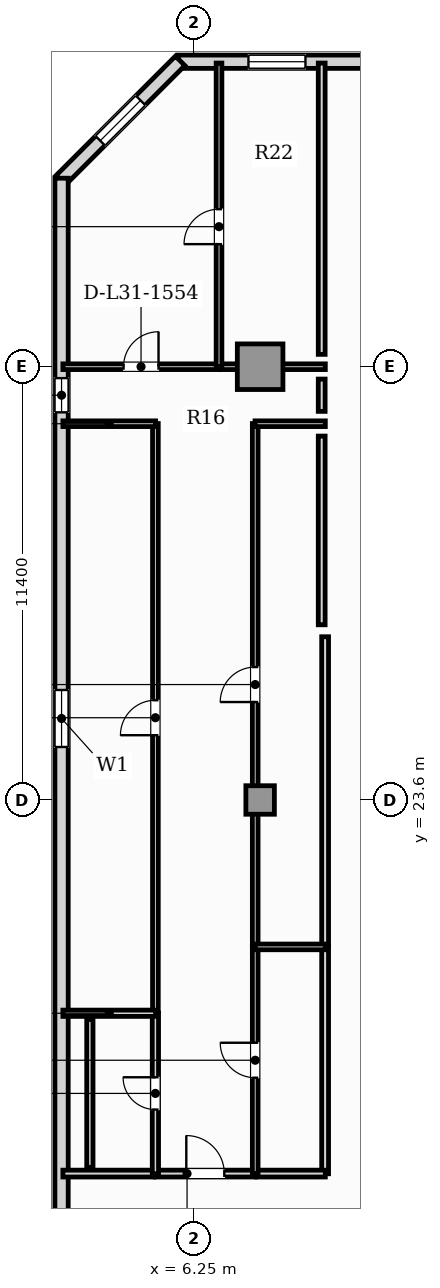
"""IFC4 building model, lengths in metres.
Left out: names, types, materials, properties, quantities, classifications, styles, units other than length and angle.
Written with IfcOpenShell. Run it as: python <this file> out.ifc"""

import sys

from ifc_helpers import new_model, si_unit, direction, frame, frame_2d, origin, origin_2d, place, context, subcontext, project, spatial, rectangle, hollow_rectangle, extrude, element, fill, save


model = new_model("IFC4")
c1 = context("Model", 3, precision=1e-05, world=origin(), true_north=direction((0.0, 1.0)))
c2 = subcontext(c1, "Body", "Model", "MODEL_VIEW")
j1 = project(units=[si_unit("LENGTHUNIT", "METRE"), si_unit("PLANEANGLEUNIT", "RADIAN")], contexts=[c1])
p1 = place(None, origin())
s1 = spatial("IfcSite", under=j1, at=p1, CompositionType="ELEMENT")
p2 = place(p1, origin())
s2 = spatial("IfcBuilding", under=s1, at=p2, CompositionType="ELEMENT")
p3 = place(p2, frame((0.0, 0.0, 127.25)))
s3 = spatial("IfcBuildingStorey", under=s2, at=p3, CompositionType="ELEMENT", Elevation=127.25)
p4 = place(p3, frame((8.0, 35.0, 0.0), z_axis=(0.0, 0.0, 1.0), x_axis=(1.0, 0.0, 0.0)))
e1 = element("IfcColumn", 1, at=p4, inside=s3, PredefinedType="USERDEFINED", context=c2, shape_type="SweptSolid", body=[
    extrude(hollow_rectangle(XDim=1.2, YDim=1.2, WallThickness=0.07, at=origin_2d()), origin(), (0.0, 0.0, 1.0), 3.85),
])
p5 = place(p3, frame((8.0, 23.6, 0.0), z_axis=(0.0, 0.0, 1.0), x_axis=(1.0, 0.0, 0.0)))
e2 = element("IfcColumn", 2, at=p5, inside=s3, PredefinedType="COLUMN", context=c2, shape_type="SweptSolid", body=[
    extrude(rectangle(XDim=0.75, YDim=0.75, at=origin_2d()), origin(), (0.0, 0.0, 1.0), 3.85),
])
p6 = place(p3, frame((51.66, 43.025, 0.0), z_axis=(0.0, 0.0, 1.0), x_axis=(-1.0, 0.0, 0.0)))
e3 = element("IfcWall", 3, at=p6, inside=s3, PredefinedType="SOLIDWALL", context=c2, shape_type="SweptSolid", body=[
    extrude(rectangle(XDim=45.82, YDim=0.35, at=frame_2d((22.91, 0.0))), origin(), (0.0, 0.0, 1.0), 3.6),
])
p7 = place(p6, frame((42.468, 0.0, 0.9)))
e4 = element("IfcOpeningElement", 4, at=p7, cuts=e3, PredefinedType="OPENING", context=c2, shape_type="SweptSolid", body=[
    extrude(rectangle(XDim=1.5, YDim=1.95, at=frame_2d((0.75, 0.975))), frame((0.0, 0.185, 0.0), z_axis=(0.0, -1.0, 0.0), x_axis=(1.0, 0.0, 0.0)), (0.0, 0.0, 1.0), 0.37),
])
p8 = place(p6, frame((1.853, 0.0, 0.9)))
e5 = element("IfcOpeningElement", 5, at=p8, cuts=e3, PredefinedType="OPENING", context=c2, shape_type="SweptSolid", body=[
    extrude(rectangle(XDim=1.5, YDim=1.95, at=frame_2d((0.75, 0.975))), frame((0.0, 0.185, 0.0), z_axis=(0.0, -1.0, 0.0), x_axis=(1.0, 0.0, 0.0)), (0.0, 0.0, 1.0), 0.37),
])
p9 = place(p6, frame((36.457, 0.0, 0.9)))
e6 = element("IfcOpeningElement", 6, at=p9, cuts=e3, PredefinedType="OPENING", context=c2, shape_type="SweptSolid", body=[
    extrude(rectangle(XDim=1.5, YDim=1.95, at=frame_2d((0.75, 0.975))), frame((0.0, 0.185, 0.0), z_axis=(0.0, -1.0, 0.0), x_axis=(1.0, 0.0, 0.0)), (0.0, 0.0, 1.0), 0.37),
])
p10 = place(p6, frame((31.777, 0.0, 0.9)))
e7 = element("IfcOpeningElement", 7, at=p10, cuts=e3, PredefinedType="OPENING", context=c2, shape_type="SweptSolid", body=[
    extrude(rectangle(XDim=1.5, YDim=1.95, at=frame_2d((0.75, 0.975))), frame((0.0, 0.185, 0.0), z_axis=(0.0, -1.0, 0.0), x_axis=(1.0, 0.0, 0.0)), (0.0, 0.0, 1.0), 0.37),
])
p11 = place(p6, frame((27.748, 0.0, 0.9)))
e8 = element("IfcOpeningElement", 8, at=p11, cuts=e3, PredefinedType="OPENING", context=c2, shape_type="SweptSolid", body=[
    extrude(rectangle(XDim=1.5, YDim=1.95, at=frame_2d((0.75, 0.975))), frame((0.0, 0.185, 0.0), z_axis=(0.0, -1.0, 0.0), x_axis=(1.0, 0.0, 0.0)), (0.0, 0.0, 1.0), 0.37),
])
p12 = place(p6, frame((23.998, 0.0, 0.9)))
e9 = element("IfcOpeningElement", 9, at=p12, cuts=e3, PredefinedType="OPENING", context=c2, shape_type="SweptSolid", body=[
    extrude(rectangle(XDim=1.5, YDim=1.95, at=frame_2d((0.75, 0.975))), frame((0.0, 0.185, 0.0), z_axis=(0.0, -1.0, 0.0), x_axis=(1.0, 0.0, 0.0)), (0.0, 0.0, 1.0), 0.37),
])
p13 = place(p6, frame((20.118, 0.0, 0.9)))
e10 = element("IfcOpeningElement", 10, at=p13, cuts=e3, PredefinedType="OPENING", context=c2, shape_type="SweptSolid", body=[
    extrude(rectangle(XDim=1.5, YDim=1.95, at=frame_2d((0.75, 0.975))), frame((0.0, 0.185, 0.0), z_axis=(0.0, -1.0, 0.0), x_axis=(1.0, 0.0, 0.0)), (0.0, 0.0, 1.0), 0.37),
])
p14 = place(p6, frame((16.368, 0.0, 0.9)))
e11 = element("IfcOpeningElement", 11, at=p14, cuts=e3, PredefinedType="OPENING", context=c2, shape_type="SweptSolid", body=[
    extrude(rectangle(XDim=1.5, YDim=1.95, at=frame_2d((0.75, 0.975))), frame((0.0, 0.185, 0.0), z_axis=(0.0, -1.0, 0.0), x_axis=(1.0, 0.0, 0.0)), (0.0, 0.0, 1.0), 0.37),
])
p15 = place(p6, frame((12.487, 0.0, 0.9)))
e12 = element("IfcOpeningElement", 12, at=p15, cuts=e3, PredefinedType="OPENING", context=c2, shape_type="SweptSolid", body=[
    extrude(rectangle(XDim=1.5, YDim=1.95, at=frame_2d((0.75, 0.975))), frame((0.0, 0.185, 0.0), z_axis=(0.0, -1.0, 0.0), x_axis=(1.0, 0.0, 0.0)), (0.0, 0.0, 1.0), 0.37),
])
p16 = place(p6, frame((7.807, 0.0, 0.9)))
e13 = element("IfcOpeningElement", 13, at=p16, cuts=e3, PredefinedType="OPENING", context=c2, shape_type="SweptSolid", body=[
    extrude(rectangle(XDim=1.5, YDim=1.95, at=frame_2d((0.75, 0.975))), frame((0.0, 0.185, 0.0), z_axis=(0.0, -1.0, 0.0), x_axis=(1.0, 0.0, 0.0)), (0.0, 0.0, 1.0), 0.37),
])
p17 = place(p3, frame((5.896, 43.048, 0.0), z_axis=(0.0, 0.0, 1.0), x_axis=(-0.707106781187, -0.707106781187, 0.0)))
e14 = element("IfcWall", 14, at=p17, inside=s3, PredefinedType="SOLIDWALL", context=c2, shape_type="SweptSolid", body=[
    extrude(rectangle(XDim=4.446, YDim=0.35, at=frame_2d((2.223, 0.0))), origin(), (0.0, 0.0, 1.0), 3.6),
])
p18 = place(p17, frame((1.473, 0.0, 0.9)))
e15 = element("IfcOpeningElement", 15, at=p18, cuts=e14, PredefinedType="OPENING", context=c2, shape_type="SweptSolid", body=[
    extrude(rectangle(XDim=1.5, YDim=1.95, at=frame_2d((0.75, 0.975))), frame((0.0, 0.185, 0.0), z_axis=(0.0, -1.0, 0.0), x_axis=(1.0, 0.0, 0.0)), (0.0, 0.0, 1.0), 0.37),
])
p19 = place(p3, frame((2.775, 39.96, 0.0), z_axis=(0.0, 0.0, 1.0), x_axis=(0.0, -1.0, 0.0)))
e16 = element("IfcWall", 16, at=p19, inside=s3, PredefinedType="SOLIDWALL", context=c2, shape_type="SweptSolid", body=[
    extrude(rectangle(XDim=36.72, YDim=0.35, at=frame_2d((18.36, 0.0))), origin(), (0.0, 0.0, 1.0), 3.6),
])
p20 = place(p19, frame((5.26, 0.0, 0.95)))
e17 = element("IfcOpeningElement", 17, at=p20, cuts=e16, PredefinedType="OPENING", context=c2, shape_type="SweptSolid", body=[
    extrude(rectangle(XDim=0.9, YDim=1.5, at=frame_2d((0.45, 0.75))), frame((0.0, 0.185, 0.0), z_axis=(0.0, -1.0, 0.0), x_axis=(1.0, 0.0, 0.0)), (0.0, 0.0, 1.0), 0.37),
])
p21 = place(p19, frame((13.466, 0.0, 0.9)))
e18 = element("IfcOpeningElement", 18, at=p21, cuts=e16, PredefinedType="OPENING", context=c2, shape_type="SweptSolid", body=[
    extrude(rectangle(XDim=1.5, YDim=1.95, at=frame_2d((0.75, 0.975))), frame((0.0, 0.185, 0.0), z_axis=(0.0, -1.0, 0.0), x_axis=(1.0, 0.0, 0.0)), (0.0, 0.0, 1.0), 0.37),
])
p22 = place(p3, frame((5.239, 13.77, 0.0), z_axis=(0.0, 0.0, 1.0), x_axis=(1.0, 0.0, 0.0)))
e19 = element("IfcWall", 19, at=p22, inside=s3, PredefinedType="PARTITIONING", context=c2, shape_type="SweptSolid", body=[
    extrude(rectangle(XDim=2.636, YDim=0.18, at=frame_2d((1.318, 0.0))), origin(), (0.0, 0.0, 1.0), 3.6),
])
p23 = place(p22, frame((0.818, 0.0, 0.0)))
e20 = element("IfcOpeningElement", 20, at=p23, cuts=e19, PredefinedType="OPENING", context=c2, shape_type="SweptSolid", body=[
    extrude(rectangle(XDim=1.0, YDim=2.15, at=frame_2d((0.5, 1.075))), frame((0.0, 0.1, 0.0), z_axis=(0.0, -1.0, 0.0), x_axis=(1.0, 0.0, 0.0)), (0.0, 0.0, 1.0), 0.2),
])
p24 = place(p3, frame((2.81, 13.77, 0.0), z_axis=(0.0, 0.0, 1.0), x_axis=(1.0, 0.0, 0.0)))
e21 = element("IfcWall", 21, at=p24, inside=s3, PredefinedType="PARTITIONING", context=c2, shape_type="SweptSolid", body=[
    extrude(rectangle(XDim=2.399, YDim=0.18, at=frame_2d((1.2, 0.0))), origin(), (0.0, 0.0, 1.0), 3.6),
])
p25 = place(p3, frame((9.71, 13.765, 0.0), z_axis=(0.0, 0.0, 1.0), x_axis=(0.0, 1.0, 0.0)))
e22 = element("IfcWall", 22, at=p25, inside=s3, PredefinedType="PARTITIONING", context=c2, shape_type="SweptSolid", body=[
    extrude(rectangle(XDim=5.974, YDim=0.18, at=frame_2d((2.987, 0.0))), origin(), (0.0, 0.0, 1.0), 3.6),
])
p26 = place(p3, frame((7.905, 13.77, 0.0), z_axis=(0.0, 0.0, 1.0), x_axis=(1.0, 0.0, 0.0)))
e23 = element("IfcWall", 23, at=p26, inside=s3, PredefinedType="PARTITIONING", context=c2, shape_type="SweptSolid", body=[
    extrude(rectangle(XDim=1.81, YDim=0.18, at=frame_2d((0.905, 0.0))), origin(), (0.0, 0.0, 1.0), 3.6),
])
p27 = place(p3, frame((9.71, 19.769, 0.0), z_axis=(0.0, 0.0, 1.0), x_axis=(0.0, 1.0, 0.0)))
e24 = element("IfcWall", 24, at=p27, inside=s3, PredefinedType="PARTITIONING", context=c2, shape_type="SweptSolid", body=[
    extrude(rectangle(XDim=8.126, YDim=0.18, at=frame_2d((4.063, 0.0))), origin(), (0.0, 0.0, 1.0), 3.6),
])
p28 = place(p3, frame((5.244, 13.765, 0.0), z_axis=(0.0, 0.0, 1.0), x_axis=(0.0, 1.0, 0.0)))
e25 = element("IfcWall", 25, at=p28, inside=s3, PredefinedType="PLUMBINGWALL", context=c2, shape_type="SweptSolid", body=[
    extrude(rectangle(XDim=4.229, YDim=0.165, at=frame_2d((2.114, 0.0))), origin(), (0.0, 0.0, 1.0), 3.6),
])
p29 = place(p28, frame((1.689, 0.0, 0.0)))
e26 = element("IfcOpeningElement", 26, at=p29, cuts=e25, PredefinedType="OPENING", context=c2, shape_type="SweptSolid", body=[
    extrude(rectangle(XDim=0.85, YDim=2.1, at=frame_2d((0.425, 1.05))), frame((0.0, 0.093, 0.0), z_axis=(0.0, -1.0, 0.0), x_axis=(1.0, 0.0, 0.0)), (0.0, 0.0, 1.0), 0.185),
])
p30 = place(p3, frame((5.244, 18.023, 0.0), z_axis=(0.0, 0.0, 1.0), x_axis=(0.0, 1.0, 0.0)))
e27 = element("IfcWall", 27, at=p30, inside=s3, PredefinedType="PARTITIONING", context=c2, shape_type="SweptSolid", body=[
    extrude(rectangle(XDim=15.481, YDim=0.15, at=frame_2d((7.741, 0.0))), origin(), (0.0, 0.0, 1.0), 3.6),
])
p31 = place(p30, frame((7.281, 0.0, 0.0)))
e28 = element("IfcOpeningElement", 28, at=p31, cuts=e27, PredefinedType="OPENING", context=c2, shape_type="SweptSolid", body=[
    extrude(rectangle(XDim=0.92, YDim=2.1, at=frame_2d((0.46, 1.05))), frame((0.0, 0.085, 0.0), z_axis=(0.0, -1.0, 0.0), x_axis=(1.0, 0.0, 0.0)), (0.0, 0.0, 1.0), 0.17),
])
p32 = place(p3, frame((2.81, 33.5, 0.0), z_axis=(0.0, 0.0, 1.0), x_axis=(1.0, 0.0, 0.0)))
e29 = element("IfcWall", 29, at=p32, inside=s3, PredefinedType="PARTITIONING", context=c2, shape_type="SweptSolid", body=[
    extrude(rectangle(XDim=2.439, YDim=0.15, at=frame_2d((1.22, 0.0))), origin(), (0.0, 0.0, 1.0), 3.6),
])
p33 = place(p3, frame((7.87, 13.765, 0.0), z_axis=(0.0, 0.0, 1.0), x_axis=(0.0, 1.0, 0.0)))
e30 = element("IfcWall", 30, at=p33, inside=s3, PredefinedType="PARTITIONING", context=c2, shape_type="SweptSolid", body=[
    extrude(rectangle(XDim=5.974, YDim=0.15, at=frame_2d((2.987, 0.0))), origin(), (0.0, 0.0, 1.0), 3.055),
])
p34 = place(p33, frame((2.527, 0.0, 0.0)))
e31 = element("IfcOpeningElement", 31, at=p34, cuts=e30, PredefinedType="OPENING", context=c2, shape_type="SweptSolid", body=[
    extrude(rectangle(XDim=0.92, YDim=2.1, at=frame_2d((0.46, 1.05))), frame((0.0, 0.085, 0.0), z_axis=(0.0, -1.0, 0.0), x_axis=(1.0, 0.0, 0.0)), (0.0, 0.0, 1.0), 0.17),
])
p35 = place(p3, frame((7.87, 19.769, 0.0), z_axis=(0.0, 0.0, 1.0), x_axis=(0.0, 1.0, 0.0)))
e32 = element("IfcWall", 32, at=p35, inside=s3, PredefinedType="PARTITIONING", context=c2, shape_type="SweptSolid", body=[
    extrude(rectangle(XDim=13.736, YDim=0.15, at=frame_2d((6.868, 0.0))), origin(), (0.0, 0.0, 1.0), 3.055),
])
p36 = place(p35, frame((6.408, 0.0, 0.0)))
e33 = element("IfcOpeningElement", 33, at=p36, cuts=e32, PredefinedType="OPENING", context=c2, shape_type="SweptSolid", body=[
    extrude(rectangle(XDim=0.92, YDim=2.1, at=frame_2d((0.46, 1.05))), frame((0.0, 0.085, 0.0), z_axis=(0.0, -1.0, 0.0), x_axis=(1.0, 0.0, 0.0)), (0.0, 0.0, 1.0), 0.17),
])
p37 = place(p3, frame((7.865, 33.5, 0.0), z_axis=(0.0, 0.0, 1.0), x_axis=(1.0, 0.0, 0.0)))
e34 = element("IfcWall", 34, at=p37, inside=s3, PredefinedType="PARTITIONING", context=c2, shape_type="SweptSolid", body=[
    extrude(rectangle(XDim=1.85, YDim=0.15, at=frame_2d((0.925, 0.0))), origin(), (0.0, 0.0, 1.0), 3.6),
])
p38 = place(p3, frame((2.81, 35.0, 0.0), z_axis=(0.0, 0.0, 1.0), x_axis=(1.0, 0.0, 0.0)))
e35 = element("IfcWall", 35, at=p38, inside=s3, PredefinedType="PARTITIONING", context=c2, shape_type="SweptSolid", body=[
    extrude(rectangle(XDim=4.113, YDim=0.15, at=frame_2d((2.057, 0.0))), origin(), (0.0, 0.0, 1.0), 3.6),
])
p39 = place(p38, frame((1.597, 0.0, 0.0)))
e36 = element("IfcOpeningElement", 36, at=p39, cuts=e35, PredefinedType="OPENING", context=c2, shape_type="SweptSolid", body=[
    extrude(rectangle(XDim=0.92, YDim=2.1, at=frame_2d((0.46, 1.05))), frame((0.0, 0.085, 0.0), z_axis=(0.0, -1.0, 0.0), x_axis=(1.0, 0.0, 0.0)), (0.0, 0.0, 1.0), 0.17),
])
p40 = place(p3, frame((6.953, 35.0, 0.0), z_axis=(0.0, 0.0, 1.0), x_axis=(1.0, 0.0, 0.0)))
e37 = element("IfcWall", 37, at=p40, inside=s3, PredefinedType="PARTITIONING", context=c2, shape_type="SweptSolid", body=[
    extrude(rectangle(XDim=2.762, YDim=0.15, at=frame_2d((1.381, 0.0))), origin(), (0.0, 0.0, 1.0), 2.983),
])
p41 = place(p3, frame((2.81, 17.988, 0.0), z_axis=(0.0, 0.0, 1.0), x_axis=(1.0, 0.0, 0.0)))
e38 = element("IfcWall", 38, at=p41, inside=s3, PredefinedType="PLUMBINGWALL", context=c2, shape_type="SweptSolid", body=[
    extrude(rectangle(XDim=2.439, YDim=0.165, at=frame_2d((1.22, 0.0))), origin(), (0.0, 0.0, 1.0), 3.6),
])
p42 = place(p3, frame((7.865, 19.734, 0.0), z_axis=(0.0, 0.0, 1.0), x_axis=(1.0, 0.0, 0.0)))
e39 = element("IfcWall", 39, at=p42, inside=s3, PredefinedType="PARTITIONING", context=c2, shape_type="SweptSolid", body=[
    extrude(rectangle(XDim=1.85, YDim=0.15, at=frame_2d((0.925, 0.0))), origin(), (0.0, 0.0, 1.0), 3.6),
])
p43 = place(p3, frame((6.918, 34.995, 0.0), z_axis=(0.0, 0.0, 1.0), x_axis=(0.0, 1.0, 0.0)))
e40 = element("IfcWall", 40, at=p43, inside=s3, PredefinedType="PARTITIONING", context=c2, shape_type="SweptSolid", body=[
    extrude(rectangle(XDim=7.995, YDim=0.15, at=frame_2d((3.998, 0.0))), origin(), (0.0, 0.0, 1.0), 3.6),
])
p44 = place(p43, frame((3.23, 0.0, 0.0)))
e41 = element("IfcOpeningElement", 41, at=p44, cuts=e40, PredefinedType="OPENING", context=c2, shape_type="SweptSolid", body=[
    extrude(rectangle(XDim=0.92, YDim=2.1, at=frame_2d((0.46, 1.05))), frame((0.0, 0.085, 0.0), z_axis=(0.0, -1.0, 0.0), x_axis=(1.0, 0.0, 0.0)), (0.0, 0.0, 1.0), 0.17),
])
p45 = place(p3, frame((9.62, 34.675, 0.0), z_axis=(0.0, 0.0, 1.0), x_axis=(0.0, -1.0, 0.0)))
e42 = element("IfcWall", 42, at=p45, inside=s3, PredefinedType="PARTITIONING", context=c2, shape_type="SweptSolid", body=[
    extrude(rectangle(XDim=0.85, YDim=0.18, at=frame_2d((0.425, 0.0))), origin(), (0.0, 0.0, 1.0), 3.6),
])
p46 = place(p3, frame((3.52, 13.935, 0.0), z_axis=(0.0, 0.0, 1.0), x_axis=(0.0, 1.0, 0.0)))
e43 = element("IfcWall", 43, at=p46, inside=s3, PredefinedType="PLUMBINGWALL", context=c2, shape_type="SweptSolid", body=[
    extrude(rectangle(XDim=3.888, YDim=0.165, at=frame_2d((1.944, 0.0))), origin(), (0.0, 0.0, 1.0), 3.6),
])
p47 = place(p3, frame((9.62, 33.175, 0.0), z_axis=(0.0, 0.0, 1.0), x_axis=(0.0, -1.0, 0.0)))
e44 = element("IfcWall", 44, at=p47, inside=s3, PredefinedType="PARTITIONING", context=c2, shape_type="SweptSolid", body=[
    extrude(rectangle(XDim=4.965, YDim=0.18, at=frame_2d((2.482, 0.0))), origin(), (0.0, 0.0, 1.0), 3.6),
])
p48 = place(p3, frame((9.62, 42.99, 0.0), z_axis=(0.0, 0.0, 1.0), x_axis=(0.0, -1.0, 0.0)))
e45 = element("IfcWall", 45, at=p48, inside=s3, PredefinedType="PARTITIONING", context=c2, shape_type="SweptSolid", body=[
    extrude(rectangle(XDim=7.665, YDim=0.18, at=frame_2d((3.833, 0.0))), origin(), (0.0, 0.0, 1.0), 3.6),
])
p49 = place(p20, origin())
e46 = element("IfcWindow", 46, at=p49, inside=s3, PartitioningType="SINGLE_PANEL", PredefinedType="WINDOW", context=c2, shape_type="SweptSolid", body=[
    extrude(rectangle(XDim=0.9, YDim=1.5, at=frame_2d((0.45, 0.75))), frame((0.0, 0.03, 0.0), z_axis=(0.0, -1.0, 0.0), x_axis=(1.0, 0.0, 0.0)), (0.0, 0.0, 1.0), 0.06),
])
fill(e17, e46)
p50 = place(p21, origin())
e47 = element("IfcWindow", 47, at=p50, inside=s3, PartitioningType="SINGLE_PANEL", PredefinedType="WINDOW", context=c2, shape_type="SweptSolid", body=[
    extrude(rectangle(XDim=1.5, YDim=1.95, at=frame_2d((0.75, 0.975))), frame((0.0, 0.03, 0.0), z_axis=(0.0, -1.0, 0.0), x_axis=(1.0, 0.0, 0.0)), (0.0, 0.0, 1.0), 0.06),
])
fill(e18, e47)
p51 = place(p18, origin())
e48 = element("IfcWindow", 48, at=p51, inside=s3, PartitioningType="SINGLE_PANEL", PredefinedType="WINDOW", context=c2, shape_type="SweptSolid", body=[
    extrude(rectangle(XDim=1.5, YDim=1.95, at=frame_2d((0.75, 0.975))), frame((0.0, 0.03, 0.0), z_axis=(0.0, -1.0, 0.0), x_axis=(1.0, 0.0, 0.0)), (0.0, 0.0, 1.0), 0.06),
])
fill(e15, e48)
p52 = place(p7, origin())
e49 = element("IfcWindow", 49, at=p52, inside=s3, PartitioningType="SINGLE_PANEL", PredefinedType="WINDOW", context=c2, shape_type="SweptSolid", body=[
    extrude(rectangle(XDim=1.5, YDim=1.95, at=frame_2d((0.75, 0.975))), frame((0.0, 0.03, 0.0), z_axis=(0.0, -1.0, 0.0), x_axis=(1.0, 0.0, 0.0)), (0.0, 0.0, 1.0), 0.06),
])
fill(e4, e49)
p53 = place(p23, origin())
e50 = element("IfcDoor", 50, at=p53, inside=s3, OperationType="SINGLE_SWING_LEFT", PredefinedType="DOOR", context=c2, shape_type="SweptSolid", body=[
    extrude(rectangle(XDim=1.0, YDim=2.15, at=frame_2d((0.5, 1.075))), frame((0.0, 0.025, 0.0), z_axis=(0.0, -1.0, 0.0), x_axis=(1.0, 0.0, 0.0)), (0.0, 0.0, 1.0), 0.05),
])
fill(e20, e50)
p54 = place(p29, origin())
e51 = element("IfcDoor", 51, at=p54, inside=s3, OperationType="SINGLE_SWING_RIGHT", PredefinedType="DOOR", context=c2, shape_type="SweptSolid", body=[
    extrude(rectangle(XDim=0.85, YDim=2.1, at=frame_2d((0.425, 1.05))), frame((0.0, 0.025, 0.0), z_axis=(0.0, -1.0, 0.0), x_axis=(1.0, 0.0, 0.0)), (0.0, 0.0, 1.0), 0.05),
])
fill(e26, e51)
p55 = place(p31, origin())
e52 = element("IfcDoor", 52, at=p55, inside=s3, OperationType="SINGLE_SWING_LEFT", PredefinedType="DOOR", context=c2, shape_type="SweptSolid", body=[
    extrude(rectangle(XDim=0.92, YDim=2.1, at=frame_2d((0.46, 1.05))), frame((0.0, 0.025, 0.0), z_axis=(0.0, -1.0, 0.0), x_axis=(1.0, 0.0, 0.0)), (0.0, 0.0, 1.0), 0.05),
])
fill(e28, e52)
p56 = place(p34, origin())
e53 = element("IfcDoor", 53, at=p56, inside=s3, OperationType="SINGLE_SWING_RIGHT", PredefinedType="DOOR", context=c2, shape_type="SweptSolid", body=[
    extrude(rectangle(XDim=0.92, YDim=2.1, at=frame_2d((0.46, 1.05))), frame((0.0, 0.025, 0.0), z_axis=(0.0, -1.0, 0.0), x_axis=(1.0, 0.0, 0.0)), (0.0, 0.0, 1.0), 0.05),
])
fill(e31, e53)
p57 = place(p36, origin())
e54 = element("IfcDoor", 54, at=p57, inside=s3, OperationType="SINGLE_SWING_LEFT", PredefinedType="DOOR", context=c2, shape_type="SweptSolid", body=[
    extrude(rectangle(XDim=0.92, YDim=2.1, at=frame_2d((0.46, 1.05))), frame((0.0, 0.025, 0.0), z_axis=(0.0, -1.0, 0.0), x_axis=(1.0, 0.0, 0.0)), (0.0, 0.0, 1.0), 0.05),
])
fill(e33, e54)
p58 = place(p39, origin())
e55 = element("IfcDoor", 55, at=p58, inside=s3, OperationType="SINGLE_SWING_RIGHT", PredefinedType="DOOR", context=c2, shape_type="SweptSolid", body=[
    extrude(rectangle(XDim=0.92, YDim=2.1, at=frame_2d((0.46, 1.05))), frame((0.0, 0.025, 0.0), z_axis=(0.0, -1.0, 0.0), x_axis=(1.0, 0.0, 0.0)), (0.0, 0.0, 1.0), 0.05),
])
fill(e36, e55)
p59 = place(p44, origin())
e56 = element("IfcDoor", 56, at=p59, inside=s3, OperationType="SINGLE_SWING_LEFT", PredefinedType="DOOR", context=c2, shape_type="SweptSolid", body=[
    extrude(rectangle(XDim=0.92, YDim=2.1, at=frame_2d((0.46, 1.05))), frame((0.0, 0.025, 0.0), z_axis=(0.0, -1.0, 0.0), x_axis=(1.0, 0.0, 0.0)), (0.0, 0.0, 1.0), 0.05),
])
fill(e41, e56)
save(model, sys.argv[1])
